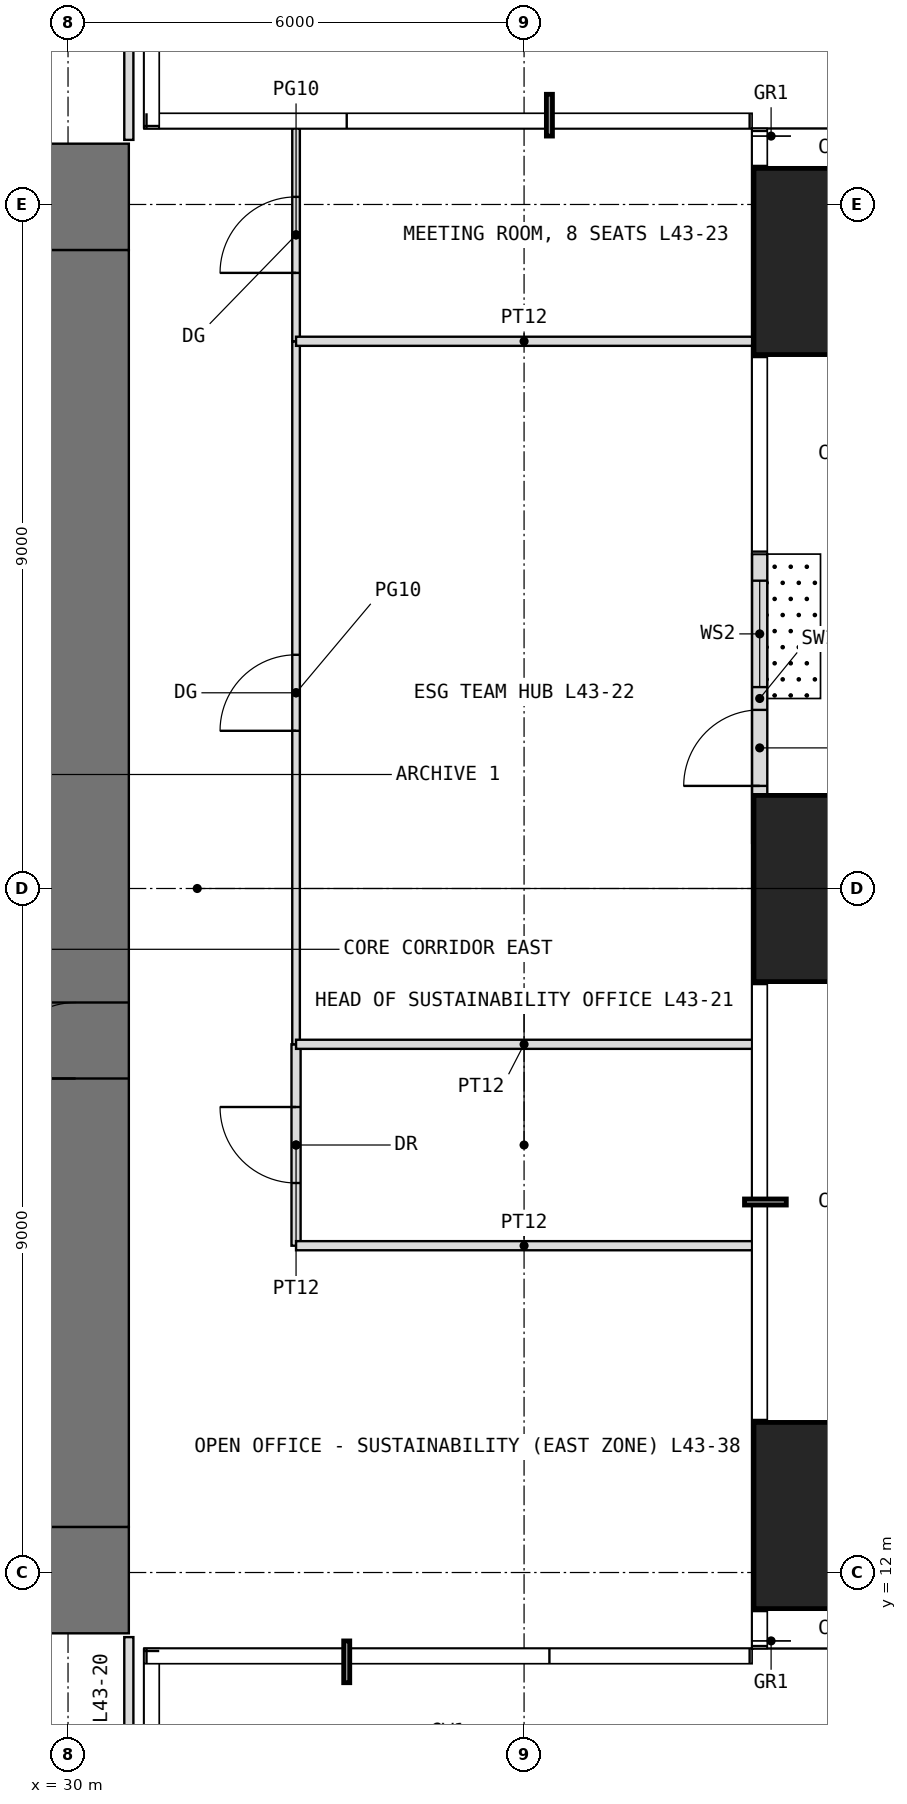
"""IFC4 building model, lengths in metres.
Left out: names, types, materials, properties, quantities, classifications, styles, units other than length and angle.
Written with IfcOpenShell. Run it as: python <this file> out.ifc"""

import sys

from ifc_helpers import new_model, si_unit, direction, frame, frame_2d, origin, origin_2d, place, context, subcontext, project, spatial, rectangle, extrude, element, fill, save


model = new_model("IFC4")
c1 = context("Model", 3, precision=1e-05, world=origin(), true_north=direction((0.0, 1.0)))
c2 = subcontext(c1, "Body", "Model", "MODEL_VIEW")
j1 = project(units=[si_unit("LENGTHUNIT", "METRE"), si_unit("PLANEANGLEUNIT", "RADIAN")], contexts=[c1])
p1 = place(None, origin())
s1 = spatial("IfcSite", under=j1, at=p1, CompositionType="ELEMENT")
p2 = place(p1, origin())
s2 = spatial("IfcBuilding", under=s1, at=p2, CompositionType="ELEMENT")
p3 = place(p2, frame((0.0, 0.0, 182.5)))
s3 = spatial("IfcBuildingStorey", under=s2, at=p3, CompositionType="ELEMENT", Elevation=182.5)
for number, where, z_axis, x_axis in (
    (1, (40.25, 12.75, 0.0), (0.0, 0.0, 1.0), (1.0, 0.0, 0.0)),
    (2, (40.25, 21.0, 0.0), (0.0, 0.0, 1.0), (1.0, 0.0, 0.0)),
    (3, (40.25, 29.25, 0.0), (0.0, 0.0, 1.0), (1.0, 0.0, 0.0)),
):
    element("IfcColumn", number, at=place(p3, frame(where, z_axis=z_axis, x_axis=x_axis)), inside=s3, PredefinedType="COLUMN", context=c2, shape_type="SweptSolid", body=[
        extrude(rectangle(XDim=2.45, YDim=2.45, at=origin_2d()), origin(), (0.0, 0.0, 1.0), 4.0),
    ])
p4 = place(p3, frame((39.1, 21.6, 0.0), z_axis=(0.0, 0.0, 1.0), x_axis=(0.0, 1.0, 0.0)))
e4 = element("IfcWall", 4, at=p4, inside=s3, PredefinedType="USERDEFINED", context=c2, shape_type="SweptSolid", body=[
    extrude(rectangle(XDim=3.8, YDim=0.2, at=frame_2d((1.9, 0.0))), origin(), (0.0, 0.0, 1.0), 3.75),
])
p5 = place(p4, frame((0.75, 0.0, 0.0)))
e5 = element("IfcOpeningElement", 5, at=p5, cuts=e4, PredefinedType="OPENING", context=c2, shape_type="SweptSolid", body=[
    extrude(rectangle(XDim=1.0, YDim=2.4, at=frame_2d((0.5, 1.2))), frame((0.0, 0.11, 0.0), z_axis=(0.0, -1.0, 0.0), x_axis=(1.0, 0.0, 0.0)), (0.0, 0.0, 1.0), 0.22),
])
p6 = place(p4, frame((2.05, 0.0, 0.3)))
e6 = element("IfcOpeningElement", 6, at=p6, cuts=e4, PredefinedType="OPENING", context=c2, shape_type="SweptSolid", body=[
    extrude(rectangle(XDim=1.4, YDim=2.7, at=frame_2d((0.7, 1.35))), frame((0.0, 0.11, 0.0), z_axis=(0.0, -1.0, 0.0), x_axis=(1.0, 0.0, 0.0)), (0.0, 0.0, 1.0), 0.22),
])
p7 = place(p3, frame((11.2, 11.9, -0.05), z_axis=(0.0, 0.0, 1.0), x_axis=(1.0, 0.0, 0.0)))
e7 = element("IfcWall", 7, at=p7, inside=s3, PredefinedType="SHEAR", context=c2, shape_type="SweptSolid", body=[
    extrude(rectangle(XDim=19.6, YDim=1.4, at=frame_2d((9.8, 0.0))), origin(), (0.0, 0.0, 1.0), 4.0),
])
p8 = place(p7, frame((8.8, 0.0, 0.05)))
e8 = element("IfcOpeningElement", 8, at=p8, cuts=e7, PredefinedType="OPENING", context=c2, shape_type="SweptSolid", body=[
    extrude(rectangle(XDim=2.0, YDim=2.2, at=frame_2d((1.0, 1.1))), frame((0.0, 0.71, 0.0), z_axis=(0.0, -1.0, 0.0), x_axis=(1.0, 0.0, 0.0)), (0.0, 0.0, 1.0), 1.42),
])
p9 = place(p3, frame((11.2, 30.1, -0.05), z_axis=(0.0, 0.0, 1.0), x_axis=(1.0, 0.0, 0.0)))
e9 = element("IfcWall", 9, at=p9, inside=s3, PredefinedType="SHEAR", context=c2, shape_type="SweptSolid", body=[
    extrude(rectangle(XDim=19.6, YDim=1.4, at=frame_2d((9.8, 0.0))), origin(), (0.0, 0.0, 1.0), 4.0),
])
p10 = place(p9, frame((8.8, 0.0, 0.05)))
e10 = element("IfcOpeningElement", 10, at=p10, cuts=e9, PredefinedType="OPENING", context=c2, shape_type="SweptSolid", body=[
    extrude(rectangle(XDim=2.0, YDim=2.2, at=frame_2d((1.0, 1.1))), frame((0.0, 0.71, 0.0), z_axis=(0.0, -1.0, 0.0), x_axis=(1.0, 0.0, 0.0)), (0.0, 0.0, 1.0), 1.42),
])
p11 = place(p3, frame((30.1, 12.6, -0.05), z_axis=(0.0, 0.0, 1.0), x_axis=(0.0, 1.0, 0.0)))
e11 = element("IfcWall", 11, at=p11, inside=s3, PredefinedType="SHEAR", context=c2, shape_type="SweptSolid", body=[
    extrude(rectangle(XDim=16.8, YDim=1.4, at=frame_2d((8.4, 0.0))), origin(), (0.0, 0.0, 1.0), 4.0),
])
p12 = place(p11, frame((5.9, 0.0, 0.05)))
e12 = element("IfcOpeningElement", 12, at=p12, cuts=e11, PredefinedType="OPENING", context=c2, shape_type="SweptSolid", body=[
    extrude(rectangle(XDim=1.0, YDim=2.2, at=frame_2d((0.5, 1.1))), frame((0.0, 0.71, 0.0), z_axis=(0.0, -1.0, 0.0), x_axis=(1.0, 0.0, 0.0)), (0.0, 0.0, 1.0), 1.42),
])
p13 = place(p3, frame((30.8, 6.7, 0.0), z_axis=(0.0, 0.0, 1.0), x_axis=(0.0, 1.0, 0.0)))
e13 = element("IfcWall", 13, at=p13, inside=s3, PredefinedType="PARTITIONING", context=c2, shape_type="SweptSolid", body=[
    extrude(rectangle(XDim=4.45, YDim=0.12, at=frame_2d((2.225, 0.0))), origin(), (0.0, 0.0, 1.0), 3.75),
])
p14 = place(p3, frame((30.8, 30.85, 0.0), z_axis=(0.0, 0.0, 1.0), x_axis=(0.0, 1.0, 0.0)))
e14 = element("IfcWall", 14, at=p14, inside=s3, PredefinedType="PARTITIONING", context=c2, shape_type="SweptSolid", body=[
    extrude(rectangle(XDim=3.15, YDim=0.12, at=frame_2d((1.575, 0.0))), origin(), (0.0, 0.0, 1.0), 3.75),
])
p15 = place(p3, frame((33.0, 16.3, 0.0), z_axis=(0.0, 0.0, 1.0), x_axis=(0.0, 1.0, 0.0)))
e15 = element("IfcWall", 15, at=p15, inside=s3, PredefinedType="PARTITIONING", context=c2, shape_type="SweptSolid", body=[
    extrude(rectangle(XDim=2.65, YDim=0.12, at=frame_2d((1.325, 0.0))), origin(), (0.0, 0.0, 1.0), 3.75),
])
p16 = place(p15, frame((0.825, 0.0, 0.0)))
e16 = element("IfcOpeningElement", 16, at=p16, cuts=e15, PredefinedType="OPENING", context=c2, shape_type="SweptSolid", body=[
    extrude(rectangle(XDim=1.0, YDim=2.2, at=frame_2d((0.5, 1.1))), frame((0.0, 0.07, 0.0), z_axis=(0.0, -1.0, 0.0), x_axis=(1.0, 0.0, 0.0)), (0.0, 0.0, 1.0), 0.14),
])
p17 = place(p3, frame((33.0, 16.3, 0.0), z_axis=(0.0, 0.0, 1.0), x_axis=(1.0, 0.0, 0.0)))
e17 = element("IfcWall", 17, at=p17, inside=s3, PredefinedType="PARTITIONING", context=c2, shape_type="SweptSolid", body=[
    extrude(rectangle(XDim=6.0, YDim=0.12, at=frame_2d((3.0, 0.0))), origin(), (0.0, 0.0, 1.0), 3.75),
])
p18 = place(p3, frame((33.0, 18.95, 0.0), z_axis=(0.0, 0.0, 1.0), x_axis=(0.0, 1.0, 0.0)))
e18 = element("IfcWall", 18, at=p18, inside=s3, PredefinedType="PARTITIONING", context=c2, shape_type="SweptSolid", body=[
    extrude(rectangle(XDim=9.25, YDim=0.1, at=frame_2d((4.625, 0.0))), origin(), (0.0, 0.0, 1.0), 3.75),
])
p19 = place(p18, frame((4.125, 0.0, 0.0)))
e19 = element("IfcOpeningElement", 19, at=p19, cuts=e18, PredefinedType="OPENING", context=c2, shape_type="SweptSolid", body=[
    extrude(rectangle(XDim=1.0, YDim=2.4, at=frame_2d((0.5, 1.2))), frame((0.0, 0.06, 0.0), z_axis=(0.0, -1.0, 0.0), x_axis=(1.0, 0.0, 0.0)), (0.0, 0.0, 1.0), 0.12),
])
p20 = place(p3, frame((33.0, 18.95, 0.0), z_axis=(0.0, 0.0, 1.0), x_axis=(1.0, 0.0, 0.0)))
e20 = element("IfcWall", 20, at=p20, inside=s3, PredefinedType="PARTITIONING", context=c2, shape_type="SweptSolid", body=[
    extrude(rectangle(XDim=6.0, YDim=0.12, at=frame_2d((3.0, 0.0))), origin(), (0.0, 0.0, 1.0), 3.75),
])
p21 = place(p3, frame((33.0, 28.2, 0.0), z_axis=(0.0, 0.0, 1.0), x_axis=(0.0, 1.0, 0.0)))
e21 = element("IfcWall", 21, at=p21, inside=s3, PredefinedType="PARTITIONING", context=c2, shape_type="SweptSolid", body=[
    extrude(rectangle(XDim=2.8, YDim=0.1, at=frame_2d((1.4, 0.0))), origin(), (0.0, 0.0, 1.0), 3.75),
])
p22 = place(p21, frame((0.9, 0.0, 0.0)))
e22 = element("IfcOpeningElement", 22, at=p22, cuts=e21, PredefinedType="OPENING", context=c2, shape_type="SweptSolid", body=[
    extrude(rectangle(XDim=1.0, YDim=2.4, at=frame_2d((0.5, 1.2))), frame((0.0, 0.06, 0.0), z_axis=(0.0, -1.0, 0.0), x_axis=(1.0, 0.0, 0.0)), (0.0, 0.0, 1.0), 0.12),
])
p23 = place(p3, frame((33.0, 28.2, 0.0), z_axis=(0.0, 0.0, 1.0), x_axis=(1.0, 0.0, 0.0)))
e23 = element("IfcWall", 23, at=p23, inside=s3, PredefinedType="PARTITIONING", context=c2, shape_type="SweptSolid", body=[
    extrude(rectangle(XDim=6.0, YDim=0.12, at=frame_2d((3.0, 0.0))), origin(), (0.0, 0.0, 1.0), 3.75),
])
p24 = place(p5, origin())
e24 = element("IfcDoor", 24, at=p24, inside=s3, OperationType="SINGLE_SWING_LEFT", PredefinedType="DOOR", context=c2, shape_type="SweptSolid", body=[
    extrude(rectangle(XDim=1.0, YDim=2.4, at=frame_2d((0.5, 1.2))), frame((0.0, 0.025, 0.0), z_axis=(0.0, -1.0, 0.0), x_axis=(1.0, 0.0, 0.0)), (0.0, 0.0, 1.0), 0.05),
])
fill(e5, e24)
p25 = place(p6, origin())
e25 = element("IfcWindow", 25, at=p25, inside=s3, PartitioningType="SINGLE_PANEL", PredefinedType="WINDOW", context=c2, shape_type="SweptSolid", body=[
    extrude(rectangle(XDim=1.4, YDim=2.7, at=frame_2d((0.7, 1.35))), frame((0.0, 0.03, 0.0), z_axis=(0.0, -1.0, 0.0), x_axis=(1.0, 0.0, 0.0)), (0.0, 0.0, 1.0), 0.06),
])
fill(e6, e25)
p26 = place(p12, origin())
e26 = element("IfcDoor", 26, at=p26, inside=s3, OperationType="SINGLE_SWING_LEFT", PredefinedType="DOOR", context=c2, shape_type="SweptSolid", body=[
    extrude(rectangle(XDim=1.0, YDim=2.2, at=frame_2d((0.5, 1.1))), frame((0.0, 0.025, 0.0), z_axis=(0.0, -1.0, 0.0), x_axis=(1.0, 0.0, 0.0)), (0.0, 0.0, 1.0), 0.05),
])
fill(e12, e26)
p27 = place(p16, origin())
e27 = element("IfcDoor", 27, at=p27, inside=s3, OperationType="SINGLE_SWING_RIGHT", PredefinedType="DOOR", context=c2, shape_type="SweptSolid", body=[
    extrude(rectangle(XDim=1.0, YDim=2.2, at=frame_2d((0.5, 1.1))), frame((0.0, 0.025, 0.0), z_axis=(0.0, -1.0, 0.0), x_axis=(1.0, 0.0, 0.0)), (0.0, 0.0, 1.0), 0.05),
])
fill(e16, e27)
p28 = place(p19, origin())
e28 = element("IfcDoor", 28, at=p28, inside=s3, OperationType="SINGLE_SWING_LEFT", PredefinedType="DOOR", context=c2, shape_type="SweptSolid", body=[
    extrude(rectangle(XDim=1.0, YDim=2.4, at=frame_2d((0.5, 1.2))), frame((0.0, 0.025, 0.0), z_axis=(0.0, -1.0, 0.0), x_axis=(1.0, 0.0, 0.0)), (0.0, 0.0, 1.0), 0.05),
])
fill(e19, e28)
p29 = place(p22, origin())
e29 = element("IfcDoor", 29, at=p29, inside=s3, OperationType="SINGLE_SWING_LEFT", PredefinedType="DOOR", context=c2, shape_type="SweptSolid", body=[
    extrude(rectangle(XDim=1.0, YDim=2.4, at=frame_2d((0.5, 1.2))), frame((0.0, 0.025, 0.0), z_axis=(0.0, -1.0, 0.0), x_axis=(1.0, 0.0, 0.0)), (0.0, 0.0, 1.0), 0.05),
])
fill(e22, e29)
save(model, sys.argv[1])
